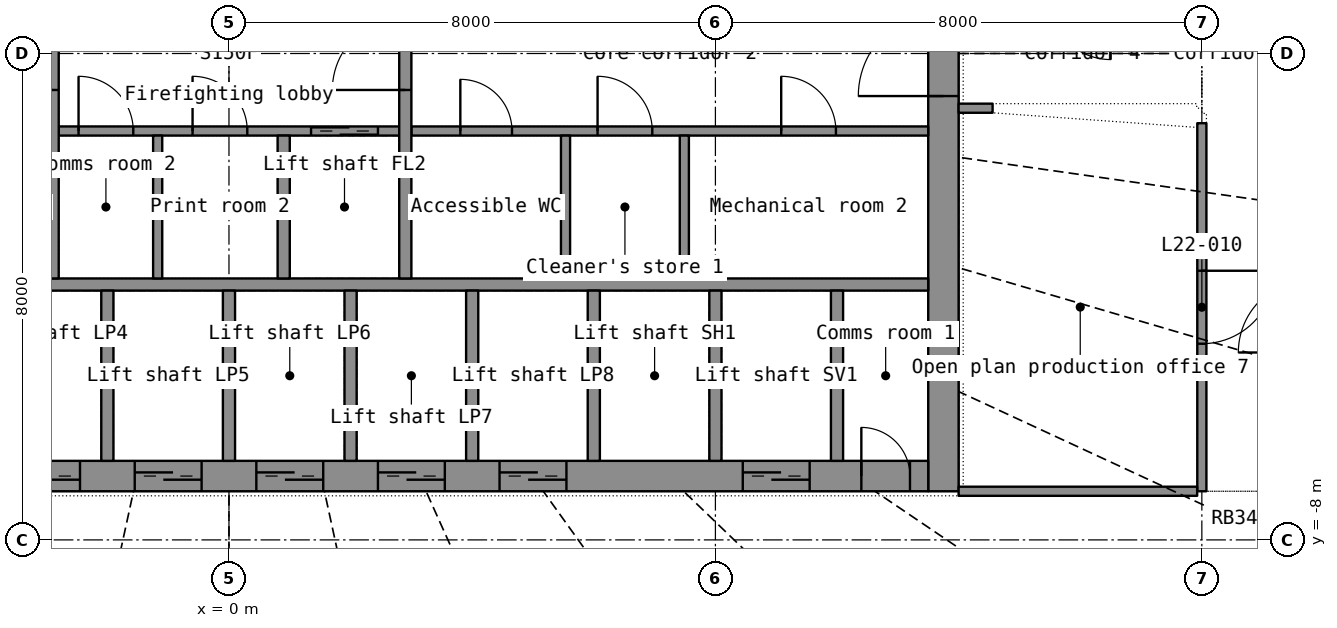
"""IFC4 building model, lengths in metres.
Left out: names, types, materials, properties, quantities, classifications, styles, units other than length and angle.
Written with IfcOpenShell. Run it as: python <this file> out.ifc"""

import sys

from ifc_helpers import new_model, si_unit, direction, frame, frame_2d, origin, place, context, subcontext, project, spatial, rectangle, extrude, element, fill, save


model = new_model("IFC4")
c1 = context("Model", 3, precision=1e-05, world=origin(), true_north=direction((0.0, 1.0)))
c2 = subcontext(c1, "Body", "Model", "MODEL_VIEW")
j1 = project(units=[si_unit("LENGTHUNIT", "METRE"), si_unit("PLANEANGLEUNIT", "RADIAN")], contexts=[c1])
p1 = place(None, origin())
s1 = spatial("IfcSite", under=j1, at=p1, CompositionType="ELEMENT")
p2 = place(p1, origin())
s2 = spatial("IfcBuilding", under=s1, at=p2, CompositionType="ELEMENT")
p3 = place(p2, frame((0.0, 0.0, 97.1)))
s3 = spatial("IfcBuildingStorey", under=s2, at=p3, CompositionType="ELEMENT", Elevation=97.1)
p4 = place(p3, frame((11.75, -7.2, 0.0), z_axis=(0.0, 0.0, 1.0), x_axis=(0.0, 1.0, 0.0)))
e1 = element("IfcWall", 1, at=p4, inside=s3, PredefinedType="SHEAR", context=c2, shape_type="SweptSolid", body=[
    extrude(rectangle(XDim=14.4, YDim=0.5, at=frame_2d((7.2, 0.0))), origin(), (0.0, 0.0, 1.0), 3.3),
])
p5 = place(p4, frame((6.5, 0.0, 0.0)))
e2 = element("IfcOpeningElement", 2, at=p5, cuts=e1, PredefinedType="OPENING", context=c2, shape_type="SweptSolid", body=[
    extrude(rectangle(XDim=1.4, YDim=2.2, at=frame_2d((0.7, 1.1))), frame((0.0, 0.26, 0.0), z_axis=(0.0, -1.0, 0.0), x_axis=(1.0, 0.0, 0.0)), (0.0, 0.0, 1.0), 0.52),
])
p6 = place(p3, frame((-11.5, -6.95, 0.0), z_axis=(0.0, 0.0, 1.0), x_axis=(1.0, 0.0, 0.0)))
e3 = element("IfcWall", 3, at=p6, inside=s3, PredefinedType="SHEAR", context=c2, shape_type="SweptSolid", body=[
    extrude(rectangle(XDim=23.0, YDim=0.5, at=frame_2d((11.5, 0.0))), origin(), (0.0, 0.0, 1.0), 3.3),
])
p7 = place(p6, frame((1.95, 0.0, 0.0)))
e4 = element("IfcOpeningElement", 4, at=p7, cuts=e3, PredefinedType="OPENING", context=c2, shape_type="SweptSolid", body=[
    extrude(rectangle(XDim=1.1, YDim=2.2, at=frame_2d((0.55, 1.1))), frame((0.0, 0.26, 0.0), z_axis=(0.0, -1.0, 0.0), x_axis=(1.0, 0.0, 0.0)), (0.0, 0.0, 1.0), 0.52),
])
p8 = place(p6, frame((3.95, 0.0, 0.0)))
e5 = element("IfcOpeningElement", 5, at=p8, cuts=e3, PredefinedType="OPENING", context=c2, shape_type="SweptSolid", body=[
    extrude(rectangle(XDim=1.1, YDim=2.2, at=frame_2d((0.55, 1.1))), frame((0.0, 0.26, 0.0), z_axis=(0.0, -1.0, 0.0), x_axis=(1.0, 0.0, 0.0)), (0.0, 0.0, 1.0), 0.52),
])
p9 = place(p6, frame((5.95, 0.0, 0.0)))
e6 = element("IfcOpeningElement", 6, at=p9, cuts=e3, PredefinedType="OPENING", context=c2, shape_type="SweptSolid", body=[
    extrude(rectangle(XDim=1.1, YDim=2.2, at=frame_2d((0.55, 1.1))), frame((0.0, 0.26, 0.0), z_axis=(0.0, -1.0, 0.0), x_axis=(1.0, 0.0, 0.0)), (0.0, 0.0, 1.0), 0.52),
])
p10 = place(p6, frame((7.95, 0.0, 0.0)))
e7 = element("IfcOpeningElement", 7, at=p10, cuts=e3, PredefinedType="OPENING", context=c2, shape_type="SweptSolid", body=[
    extrude(rectangle(XDim=1.1, YDim=2.2, at=frame_2d((0.55, 1.1))), frame((0.0, 0.26, 0.0), z_axis=(0.0, -1.0, 0.0), x_axis=(1.0, 0.0, 0.0)), (0.0, 0.0, 1.0), 0.52),
])
p11 = place(p6, frame((9.95, 0.0, 0.0)))
e8 = element("IfcOpeningElement", 8, at=p11, cuts=e3, PredefinedType="OPENING", context=c2, shape_type="SweptSolid", body=[
    extrude(rectangle(XDim=1.1, YDim=2.2, at=frame_2d((0.55, 1.1))), frame((0.0, 0.26, 0.0), z_axis=(0.0, -1.0, 0.0), x_axis=(1.0, 0.0, 0.0)), (0.0, 0.0, 1.0), 0.52),
])
p12 = place(p6, frame((11.95, 0.0, 0.0)))
e9 = element("IfcOpeningElement", 9, at=p12, cuts=e3, PredefinedType="OPENING", context=c2, shape_type="SweptSolid", body=[
    extrude(rectangle(XDim=1.1, YDim=2.2, at=frame_2d((0.55, 1.1))), frame((0.0, 0.26, 0.0), z_axis=(0.0, -1.0, 0.0), x_axis=(1.0, 0.0, 0.0)), (0.0, 0.0, 1.0), 0.52),
])
p13 = place(p6, frame((13.95, 0.0, 0.0)))
e10 = element("IfcOpeningElement", 10, at=p13, cuts=e3, PredefinedType="OPENING", context=c2, shape_type="SweptSolid", body=[
    extrude(rectangle(XDim=1.1, YDim=2.2, at=frame_2d((0.55, 1.1))), frame((0.0, 0.26, 0.0), z_axis=(0.0, -1.0, 0.0), x_axis=(1.0, 0.0, 0.0)), (0.0, 0.0, 1.0), 0.52),
])
p14 = place(p6, frame((15.95, 0.0, 0.0)))
e11 = element("IfcOpeningElement", 11, at=p14, cuts=e3, PredefinedType="OPENING", context=c2, shape_type="SweptSolid", body=[
    extrude(rectangle(XDim=1.1, YDim=2.2, at=frame_2d((0.55, 1.1))), frame((0.0, 0.26, 0.0), z_axis=(0.0, -1.0, 0.0), x_axis=(1.0, 0.0, 0.0)), (0.0, 0.0, 1.0), 0.52),
])
p15 = place(p6, frame((19.95, 0.0, 0.0)))
e12 = element("IfcOpeningElement", 12, at=p15, cuts=e3, PredefinedType="OPENING", context=c2, shape_type="SweptSolid", body=[
    extrude(rectangle(XDim=1.1, YDim=2.2, at=frame_2d((0.55, 1.1))), frame((0.0, 0.26, 0.0), z_axis=(0.0, -1.0, 0.0), x_axis=(1.0, 0.0, 0.0)), (0.0, 0.0, 1.0), 0.52),
])
p16 = place(p6, frame((0.3, 0.0, 0.0)))
e13 = element("IfcOpeningElement", 13, at=p16, cuts=e3, PredefinedType="OPENING", context=c2, shape_type="SweptSolid", body=[
    extrude(rectangle(XDim=0.8, YDim=2.05, at=frame_2d((0.4, 1.025))), frame((0.0, 0.26, 0.0), z_axis=(0.0, -1.0, 0.0), x_axis=(1.0, 0.0, 0.0)), (0.0, 0.0, 1.0), 0.52),
])
p17 = place(p6, frame((21.9, 0.0, 0.0)))
e14 = element("IfcOpeningElement", 14, at=p17, cuts=e3, PredefinedType="OPENING", context=c2, shape_type="SweptSolid", body=[
    extrude(rectangle(XDim=0.8, YDim=2.05, at=frame_2d((0.4, 1.025))), frame((0.0, 0.26, 0.0), z_axis=(0.0, -1.0, 0.0), x_axis=(1.0, 0.0, 0.0)), (0.0, 0.0, 1.0), 0.52),
])
p18 = place(p3, frame((-11.5, -3.8, 0.0), z_axis=(0.0, 0.0, 1.0), x_axis=(1.0, 0.0, 0.0)))
e15 = element("IfcWall", 15, at=p18, inside=s3, PredefinedType="SHEAR", context=c2, shape_type="SweptSolid", body=[
    extrude(rectangle(XDim=23.0, YDim=0.2, at=frame_2d((11.5, 0.0))), origin(), (0.0, 0.0, 1.0), 3.3),
])
for number, where, z_axis, x_axis in (
    (16, (-2.0, -6.7, 0.0), (0.0, 0.0, 1.0), (0.0, 1.0, 0.0)),
    (17, (0.0, -6.7, 0.0), (0.0, 0.0, 1.0), (0.0, 1.0, 0.0)),
    (18, (2.0, -6.7, 0.0), (0.0, 0.0, 1.0), (0.0, 1.0, 0.0)),
    (19, (4.0, -6.7, 0.0), (0.0, 0.0, 1.0), (0.0, 1.0, 0.0)),
    (20, (6.0, -6.7, 0.0), (0.0, 0.0, 1.0), (0.0, 1.0, 0.0)),
    (21, (8.0, -6.7, 0.0), (0.0, 0.0, 1.0), (0.0, 1.0, 0.0)),
    (22, (10.0, -6.7, 0.0), (0.0, 0.0, 1.0), (0.0, 1.0, 0.0)),
):
    element("IfcWall", number, at=place(p3, frame(where, z_axis=z_axis, x_axis=x_axis)), inside=s3, PredefinedType="SHEAR", context=c2, shape_type="SweptSolid", body=[
        extrude(rectangle(XDim=2.8, YDim=0.2, at=frame_2d((1.4, 0.0))), origin(), (0.0, 0.0, 1.0), 3.3),
    ])
p19 = place(p3, frame((-2.8, -1.275, 0.0), z_axis=(0.0, 0.0, 1.0), x_axis=(1.0, 0.0, 0.0)))
e23 = element("IfcWall", 23, at=p19, inside=s3, PredefinedType="SHEAR", context=c2, shape_type="SweptSolid", body=[
    extrude(rectangle(XDim=5.6, YDim=0.15, at=frame_2d((2.8, 0.0))), origin(), (0.0, 0.0, 1.0), 3.3),
])
p20 = place(p19, frame((4.15, 0.0, 0.0)))
e24 = element("IfcOpeningElement", 24, at=p20, cuts=e23, PredefinedType="OPENING", context=c2, shape_type="SweptSolid", body=[
    extrude(rectangle(XDim=1.1, YDim=2.2, at=frame_2d((0.55, 1.1))), frame((0.0, 0.085, 0.0), z_axis=(0.0, -1.0, 0.0), x_axis=(1.0, 0.0, 0.0)), (0.0, 0.0, 1.0), 0.17),
])
p21 = place(p19, frame((0.326, 0.0, 0.0)))
e25 = element("IfcOpeningElement", 25, at=p21, cuts=e23, PredefinedType="OPENING", context=c2, shape_type="SweptSolid", body=[
    extrude(rectangle(XDim=0.9, YDim=2.1, at=frame_2d((0.45, 1.05))), frame((0.0, 0.085, 0.0), z_axis=(0.0, -1.0, 0.0), x_axis=(1.0, 0.0, 0.0)), (0.0, 0.0, 1.0), 0.17),
])
p22 = place(p19, frame((2.201, 0.0, 0.0)))
e26 = element("IfcOpeningElement", 26, at=p22, cuts=e23, PredefinedType="OPENING", context=c2, shape_type="SweptSolid", body=[
    extrude(rectangle(XDim=0.9, YDim=2.1, at=frame_2d((0.45, 1.05))), frame((0.0, 0.085, 0.0), z_axis=(0.0, -1.0, 0.0), x_axis=(1.0, 0.0, 0.0)), (0.0, 0.0, 1.0), 0.17),
])
p23 = place(p3, frame((3.0, -1.275, 0.0), z_axis=(0.0, 0.0, 1.0), x_axis=(1.0, 0.0, 0.0)))
e27 = element("IfcWall", 27, at=p23, inside=s3, PredefinedType="PARTITIONING", context=c2, shape_type="SweptSolid", body=[
    extrude(rectangle(XDim=8.5, YDim=0.15, at=frame_2d((4.25, 0.0))), origin(), (0.0, 0.0, 1.0), 3.3),
])
p24 = place(p23, frame((0.805, 0.0, 0.0)))
e28 = element("IfcOpeningElement", 28, at=p24, cuts=e27, PredefinedType="OPENING", context=c2, shape_type="SweptSolid", body=[
    extrude(rectangle(XDim=0.85, YDim=2.1, at=frame_2d((0.425, 1.05))), frame((0.0, 0.085, 0.0), z_axis=(0.0, -1.0, 0.0), x_axis=(1.0, 0.0, 0.0)), (0.0, 0.0, 1.0), 0.17),
])
p25 = place(p23, frame((3.062, 0.0, 0.0)))
e29 = element("IfcOpeningElement", 29, at=p25, cuts=e27, PredefinedType="OPENING", context=c2, shape_type="SweptSolid", body=[
    extrude(rectangle(XDim=0.9, YDim=2.1, at=frame_2d((0.45, 1.05))), frame((0.0, 0.085, 0.0), z_axis=(0.0, -1.0, 0.0), x_axis=(1.0, 0.0, 0.0)), (0.0, 0.0, 1.0), 0.17),
])
p26 = place(p23, frame((6.082, 0.0, 0.0)))
e30 = element("IfcOpeningElement", 30, at=p26, cuts=e27, PredefinedType="OPENING", context=c2, shape_type="SweptSolid", body=[
    extrude(rectangle(XDim=0.9, YDim=2.1, at=frame_2d((0.45, 1.05))), frame((0.0, 0.085, 0.0), z_axis=(0.0, -1.0, 0.0), x_axis=(1.0, 0.0, 0.0)), (0.0, 0.0, 1.0), 0.17),
])
p27 = place(p3, frame((-2.9, -3.7, 0.0), z_axis=(0.0, 0.0, 1.0), x_axis=(0.0, 1.0, 0.0)))
e31 = element("IfcWall", 31, at=p27, inside=s3, PredefinedType="SHEAR", context=c2, shape_type="SweptSolid", body=[
    extrude(rectangle(XDim=7.4, YDim=0.2, at=frame_2d((3.7, 0.0))), origin(), (0.0, 0.0, 1.0), 3.3),
])
p28 = place(p27, frame((3.1, 0.0, 0.0)))
e32 = element("IfcOpeningElement", 32, at=p28, cuts=e31, PredefinedType="OPENING", context=c2, shape_type="SweptSolid", body=[
    extrude(rectangle(XDim=1.2, YDim=2.2, at=frame_2d((0.6, 1.1))), frame((0.0, 0.11, 0.0), z_axis=(0.0, -1.0, 0.0), x_axis=(1.0, 0.0, 0.0)), (0.0, 0.0, 1.0), 0.22),
])
p29 = place(p3, frame((2.9, -3.7, 0.0), z_axis=(0.0, 0.0, 1.0), x_axis=(0.0, 1.0, 0.0)))
e33 = element("IfcWall", 33, at=p29, inside=s3, PredefinedType="SHEAR", context=c2, shape_type="SweptSolid", body=[
    extrude(rectangle(XDim=7.4, YDim=0.2, at=frame_2d((3.7, 0.0))), origin(), (0.0, 0.0, 1.0), 3.3),
])
p30 = place(p29, frame((3.1, 0.0, 0.0)))
e34 = element("IfcOpeningElement", 34, at=p30, cuts=e33, PredefinedType="OPENING", context=c2, shape_type="SweptSolid", body=[
    extrude(rectangle(XDim=1.2, YDim=2.2, at=frame_2d((0.6, 1.1))), frame((0.0, 0.11, 0.0), z_axis=(0.0, -1.0, 0.0), x_axis=(1.0, 0.0, 0.0)), (0.0, 0.0, 1.0), 0.22),
])
p31 = place(p3, frame((0.9, -3.7, 0.0), z_axis=(0.0, 0.0, 1.0), x_axis=(0.0, 1.0, 0.0)))
e35 = element("IfcWall", 35, at=p31, inside=s3, PredefinedType="SHEAR", context=c2, shape_type="SweptSolid", body=[
    extrude(rectangle(XDim=2.35, YDim=0.2, at=frame_2d((1.175, 0.0))), origin(), (0.0, 0.0, 1.0), 3.3),
])
for number, where, z_axis, x_axis in (
    (36, (5.535, -3.7, 0.0), (0.0, 0.0, 1.0), (0.0, 1.0, 0.0)),
    (37, (7.489, -3.7, 0.0), (0.0, 0.0, 1.0), (0.0, 1.0, 0.0)),
    (38, (-1.173, -3.7, 0.0), (0.0, 0.0, 1.0), (0.0, 1.0, 0.0)),
):
    element("IfcWall", number, at=place(p3, frame(where, z_axis=z_axis, x_axis=x_axis)), inside=s3, PredefinedType="PARTITIONING", context=c2, shape_type="SweptSolid", body=[
        extrude(rectangle(XDim=2.35, YDim=0.15, at=frame_2d((1.175, 0.0))), origin(), (0.0, 0.0, 1.0), 3.3),
    ])
p32 = place(p3, frame((16.0, -1.146, 0.0), z_axis=(0.0, 0.0, 1.0), x_axis=(0.0, -1.0, 0.0)))
e39 = element("IfcWall", 39, at=p32, inside=s3, PredefinedType="PARTITIONING", context=c2, shape_type="SweptSolid", body=[
    extrude(rectangle(XDim=6.053, YDim=0.15, at=frame_2d((3.027, 0.0))), origin(), (0.0, 0.0, 1.0), 2.4),
])
p33 = place(p32, frame((2.427, 0.0, 0.0)))
e40 = element("IfcOpeningElement", 40, at=p33, cuts=e39, PredefinedType="OPENING", context=c2, shape_type="SweptSolid", body=[
    extrude(rectangle(XDim=1.2, YDim=2.2, at=frame_2d((0.6, 1.1))), frame((0.0, 0.085, 0.0), z_axis=(0.0, -1.0, 0.0), x_axis=(1.0, 0.0, 0.0)), (0.0, 0.0, 1.0), 0.17),
])
p34 = place(p3, frame((15.923, -7.2, 0.0), z_axis=(0.0, 0.0, 1.0), x_axis=(-1.0, 0.0, 0.0)))
e41 = element("IfcWall", 41, at=p34, inside=s3, PredefinedType="PARTITIONING", context=c2, shape_type="SweptSolid", body=[
    extrude(rectangle(XDim=3.923, YDim=0.15, at=frame_2d((1.961, 0.0))), origin(), (0.0, 0.0, 1.0), 2.4),
])
p35 = place(p3, frame((12.0, -0.9, 0.0), z_axis=(0.0, 0.0, 1.0), x_axis=(1.0, 0.0, 0.0)))
e42 = element("IfcWall", 42, at=p35, inside=s3, PredefinedType="PARTITIONING", context=c2, shape_type="SweptSolid", body=[
    extrude(rectangle(XDim=0.559, YDim=0.15, at=frame_2d((0.279, 0.0))), origin(), (0.0, 0.0, 1.0), 2.4),
])
p36 = place(p10, origin())
e43 = element("IfcDoor", 43, at=p36, inside=s3, OperationType="DOUBLE_DOOR_SLIDING", PredefinedType="DOOR", context=c2, shape_type="SweptSolid", body=[
    extrude(rectangle(XDim=1.1, YDim=2.2, at=frame_2d((0.55, 1.1))), frame((0.0, 0.025, 0.0), z_axis=(0.0, -1.0, 0.0), x_axis=(1.0, 0.0, 0.0)), (0.0, 0.0, 1.0), 0.05),
])
fill(e7, e43)
p37 = place(p11, origin())
e44 = element("IfcDoor", 44, at=p37, inside=s3, OperationType="DOUBLE_DOOR_SLIDING", PredefinedType="DOOR", context=c2, shape_type="SweptSolid", body=[
    extrude(rectangle(XDim=1.1, YDim=2.2, at=frame_2d((0.55, 1.1))), frame((0.0, 0.025, 0.0), z_axis=(0.0, -1.0, 0.0), x_axis=(1.0, 0.0, 0.0)), (0.0, 0.0, 1.0), 0.05),
])
fill(e8, e44)
p38 = place(p12, origin())
e45 = element("IfcDoor", 45, at=p38, inside=s3, OperationType="DOUBLE_DOOR_SLIDING", PredefinedType="DOOR", context=c2, shape_type="SweptSolid", body=[
    extrude(rectangle(XDim=1.1, YDim=2.2, at=frame_2d((0.55, 1.1))), frame((0.0, 0.025, 0.0), z_axis=(0.0, -1.0, 0.0), x_axis=(1.0, 0.0, 0.0)), (0.0, 0.0, 1.0), 0.05),
])
fill(e9, e45)
p39 = place(p13, origin())
e46 = element("IfcDoor", 46, at=p39, inside=s3, OperationType="DOUBLE_DOOR_SLIDING", PredefinedType="DOOR", context=c2, shape_type="SweptSolid", body=[
    extrude(rectangle(XDim=1.1, YDim=2.2, at=frame_2d((0.55, 1.1))), frame((0.0, 0.025, 0.0), z_axis=(0.0, -1.0, 0.0), x_axis=(1.0, 0.0, 0.0)), (0.0, 0.0, 1.0), 0.05),
])
fill(e10, e46)
p40 = place(p14, origin())
e47 = element("IfcDoor", 47, at=p40, inside=s3, OperationType="DOUBLE_DOOR_SLIDING", PredefinedType="DOOR", context=c2, shape_type="SweptSolid", body=[
    extrude(rectangle(XDim=1.1, YDim=2.2, at=frame_2d((0.55, 1.1))), frame((0.0, 0.025, 0.0), z_axis=(0.0, -1.0, 0.0), x_axis=(1.0, 0.0, 0.0)), (0.0, 0.0, 1.0), 0.05),
])
fill(e11, e47)
p41 = place(p15, origin())
e48 = element("IfcDoor", 48, at=p41, inside=s3, OperationType="DOUBLE_DOOR_SLIDING", PredefinedType="DOOR", context=c2, shape_type="SweptSolid", body=[
    extrude(rectangle(XDim=1.1, YDim=2.2, at=frame_2d((0.55, 1.1))), frame((0.0, 0.025, 0.0), z_axis=(0.0, -1.0, 0.0), x_axis=(1.0, 0.0, 0.0)), (0.0, 0.0, 1.0), 0.05),
])
fill(e12, e48)
p42 = place(p17, origin())
e49 = element("IfcDoor", 49, at=p42, inside=s3, OperationType="SINGLE_SWING_LEFT", PredefinedType="DOOR", context=c2, shape_type="SweptSolid", body=[
    extrude(rectangle(XDim=0.8, YDim=2.05, at=frame_2d((0.4, 1.025))), frame((0.0, 0.025, 0.0), z_axis=(0.0, -1.0, 0.0), x_axis=(1.0, 0.0, 0.0)), (0.0, 0.0, 1.0), 0.05),
])
fill(e14, e49)
p43 = place(p5, origin())
e50 = element("IfcDoor", 50, at=p43, inside=s3, OperationType="DOUBLE_DOOR_SINGLE_SWING", PredefinedType="DOOR", context=c2, shape_type="SweptSolid", body=[
    extrude(rectangle(XDim=1.4, YDim=2.2, at=frame_2d((0.7, 1.1))), frame((0.0, 0.025, 0.0), z_axis=(0.0, -1.0, 0.0), x_axis=(1.0, 0.0, 0.0)), (0.0, 0.0, 1.0), 0.05),
])
fill(e2, e50)
p44 = place(p28, origin())
e51 = element("IfcDoor", 51, at=p44, inside=s3, OperationType="SINGLE_SWING_LEFT", PredefinedType="DOOR", context=c2, shape_type="SweptSolid", body=[
    extrude(rectangle(XDim=1.2, YDim=2.2, at=frame_2d((0.6, 1.1))), frame((0.0, 0.025, 0.0), z_axis=(0.0, -1.0, 0.0), x_axis=(1.0, 0.0, 0.0)), (0.0, 0.0, 1.0), 0.05),
])
fill(e32, e51)
p45 = place(p30, origin())
e52 = element("IfcDoor", 52, at=p45, inside=s3, OperationType="SINGLE_SWING_LEFT", PredefinedType="DOOR", context=c2, shape_type="SweptSolid", body=[
    extrude(rectangle(XDim=1.2, YDim=2.2, at=frame_2d((0.6, 1.1))), frame((0.0, 0.025, 0.0), z_axis=(0.0, -1.0, 0.0), x_axis=(1.0, 0.0, 0.0)), (0.0, 0.0, 1.0), 0.05),
])
fill(e34, e52)
p46 = place(p20, origin())
e53 = element("IfcDoor", 53, at=p46, inside=s3, OperationType="DOUBLE_DOOR_SLIDING", PredefinedType="DOOR", context=c2, shape_type="SweptSolid", body=[
    extrude(rectangle(XDim=1.1, YDim=2.2, at=frame_2d((0.55, 1.1))), frame((0.0, 0.025, 0.0), z_axis=(0.0, -1.0, 0.0), x_axis=(1.0, 0.0, 0.0)), (0.0, 0.0, 1.0), 0.05),
])
fill(e24, e53)
p47 = place(p24, origin())
e54 = element("IfcDoor", 54, at=p47, inside=s3, OperationType="SINGLE_SWING_LEFT", PredefinedType="DOOR", context=c2, shape_type="SweptSolid", body=[
    extrude(rectangle(XDim=0.85, YDim=2.1, at=frame_2d((0.425, 1.05))), frame((0.0, 0.025, 0.0), z_axis=(0.0, -1.0, 0.0), x_axis=(1.0, 0.0, 0.0)), (0.0, 0.0, 1.0), 0.05),
])
fill(e28, e54)
p48 = place(p25, origin())
e55 = element("IfcDoor", 55, at=p48, inside=s3, OperationType="SINGLE_SWING_LEFT", PredefinedType="DOOR", context=c2, shape_type="SweptSolid", body=[
    extrude(rectangle(XDim=0.9, YDim=2.1, at=frame_2d((0.45, 1.05))), frame((0.0, 0.025, 0.0), z_axis=(0.0, -1.0, 0.0), x_axis=(1.0, 0.0, 0.0)), (0.0, 0.0, 1.0), 0.05),
])
fill(e29, e55)
p49 = place(p26, origin())
e56 = element("IfcDoor", 56, at=p49, inside=s3, OperationType="SINGLE_SWING_LEFT", PredefinedType="DOOR", context=c2, shape_type="SweptSolid", body=[
    extrude(rectangle(XDim=0.9, YDim=2.1, at=frame_2d((0.45, 1.05))), frame((0.0, 0.025, 0.0), z_axis=(0.0, -1.0, 0.0), x_axis=(1.0, 0.0, 0.0)), (0.0, 0.0, 1.0), 0.05),
])
fill(e30, e56)
p50 = place(p21, origin())
e57 = element("IfcDoor", 57, at=p50, inside=s3, OperationType="SINGLE_SWING_LEFT", PredefinedType="DOOR", context=c2, shape_type="SweptSolid", body=[
    extrude(rectangle(XDim=0.9, YDim=2.1, at=frame_2d((0.45, 1.05))), frame((0.0, 0.025, 0.0), z_axis=(0.0, -1.0, 0.0), x_axis=(1.0, 0.0, 0.0)), (0.0, 0.0, 1.0), 0.05),
])
fill(e25, e57)
p51 = place(p22, origin())
e58 = element("IfcDoor", 58, at=p51, inside=s3, OperationType="SINGLE_SWING_LEFT", PredefinedType="DOOR", context=c2, shape_type="SweptSolid", body=[
    extrude(rectangle(XDim=0.9, YDim=2.1, at=frame_2d((0.45, 1.05))), frame((0.0, 0.025, 0.0), z_axis=(0.0, -1.0, 0.0), x_axis=(1.0, 0.0, 0.0)), (0.0, 0.0, 1.0), 0.05),
])
fill(e26, e58)
p52 = place(p33, origin())
e59 = element("IfcDoor", 59, at=p52, inside=s3, OperationType="DOUBLE_DOOR_SINGLE_SWING", PredefinedType="DOOR", context=c2, shape_type="SweptSolid", body=[
    extrude(rectangle(XDim=1.2, YDim=2.2, at=frame_2d((0.6, 1.1))), frame((0.0, 0.025, 0.0), z_axis=(0.0, -1.0, 0.0), x_axis=(1.0, 0.0, 0.0)), (0.0, 0.0, 1.0), 0.05),
])
fill(e40, e59)
save(model, sys.argv[1])
